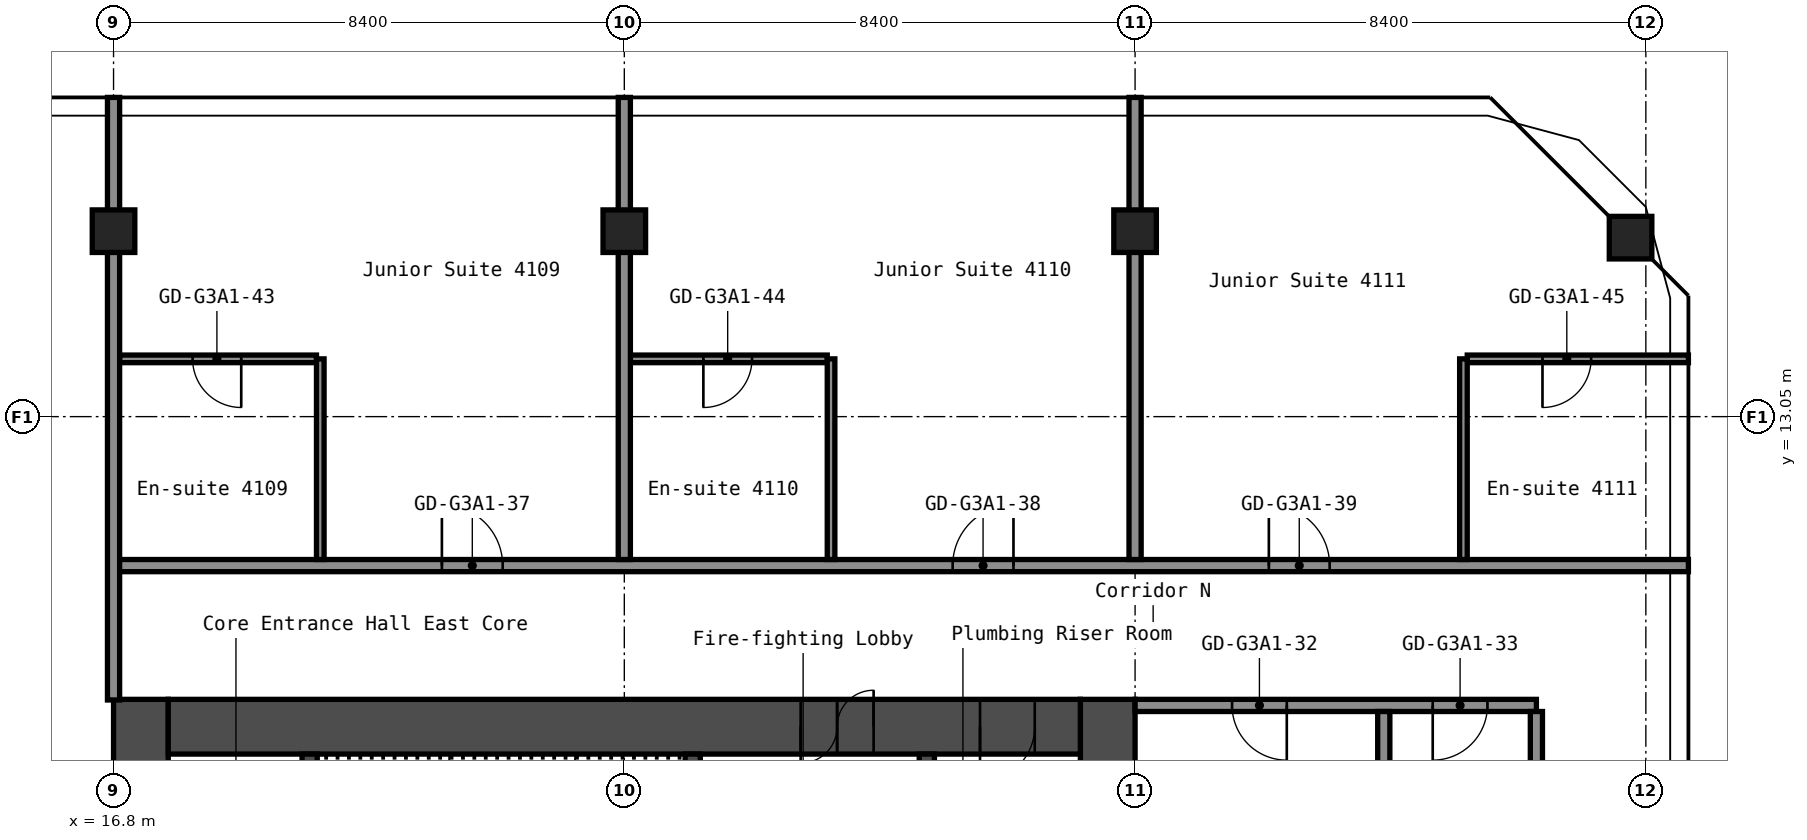
"""IFC4 building model, lengths in metres.
Left out: names, types, materials, properties, quantities, classifications, styles, units other than length and angle.
Written with IfcOpenShell. Run it as: python <this file> out.ifc"""

import sys

from ifc_helpers import new_model, si_unit, direction, frame, frame_2d, origin, origin_2d, place, context, subcontext, project, spatial, rectangle, hollow_rectangle, extrude, element, fill, save


model = new_model("IFC4")
c1 = context("Model", 3, precision=1e-05, world=origin(), true_north=direction((0.0, 1.0)))
c2 = subcontext(c1, "Body", "Model", "MODEL_VIEW")
j1 = project(units=[si_unit("LENGTHUNIT", "METRE"), si_unit("PLANEANGLEUNIT", "RADIAN")], contexts=[c1])
p1 = place(None, origin())
s1 = spatial("IfcSite", under=j1, at=p1, CompositionType="ELEMENT")
p2 = place(p1, origin())
s2 = spatial("IfcBuilding", under=s1, at=p2, CompositionType="ELEMENT")
p3 = place(p2, frame((0.0, 0.0, 147.0)))
s3 = spatial("IfcBuildingStorey", under=s2, at=p3, CompositionType="ELEMENT", Elevation=147.0)
for number, where, z_axis, x_axis in (
    (1, (16.8, 16.1, 0.0), (0.0, 0.0, 1.0), (1.0, 0.0, 0.0)),
    (2, (25.2, 16.1, 0.0), (0.0, 0.0, 1.0), (1.0, 0.0, 0.0)),
    (3, (33.6, 16.1, 0.0), (0.0, 0.0, 1.0), (1.0, 0.0, 0.0)),
    (4, (41.749, 15.994, 0.0), (0.0, 0.0, 1.0), (1.0, 0.0, 0.0)),
):
    element("IfcColumn", number, at=place(p3, frame(where, z_axis=z_axis, x_axis=x_axis)), inside=s3, PredefinedType="COLUMN", context=c2, shape_type="SweptSolid", body=[
        extrude(hollow_rectangle(XDim=0.7, YDim=0.7, WallThickness=0.028, at=origin_2d()), origin(), (0.0, 0.0, 1.0), 2.75),
    ])
p4 = place(p3, frame((17.25, -8.4, 0.0), z_axis=(0.0, 0.0, 1.0), x_axis=(0.0, 1.0, 0.0)))
e5 = element("IfcWall", 5, at=p4, inside=s3, PredefinedType="SHEAR", context=c2, shape_type="SweptSolid", body=[
    extrude(rectangle(XDim=16.8, YDim=0.9, at=frame_2d((8.4, 0.0))), origin(), (0.0, 0.0, 1.0), 2.75),
])
p5 = place(p4, frame((7.1, 0.0, 0.0)))
e6 = element("IfcOpeningElement", 6, at=p5, cuts=e5, PredefinedType="OPENING", context=c2, shape_type="SweptSolid", body=[
    extrude(rectangle(XDim=1.6, YDim=2.1, at=frame_2d((0.8, 1.05))), frame((0.0, 0.46, 0.0), z_axis=(0.0, -1.0, 0.0), x_axis=(1.0, 0.0, 0.0)), (0.0, 0.0, 1.0), 0.92),
])
p6 = place(p3, frame((33.15, -8.4, 0.0), z_axis=(0.0, 0.0, 1.0), x_axis=(0.0, 1.0, 0.0)))
e7 = element("IfcWall", 7, at=p6, inside=s3, PredefinedType="SHEAR", context=c2, shape_type="SweptSolid", body=[
    extrude(rectangle(XDim=16.8, YDim=0.9, at=frame_2d((8.4, 0.0))), origin(), (0.0, 0.0, 1.0), 2.75),
])
p7 = place(p3, frame((17.7, 7.95, 0.0), z_axis=(0.0, 0.0, 1.0), x_axis=(1.0, 0.0, 0.0)))
e8 = element("IfcWall", 8, at=p7, inside=s3, PredefinedType="SHEAR", context=c2, shape_type="SweptSolid", body=[
    extrude(rectangle(XDim=15.0, YDim=0.9, at=frame_2d((7.5, 0.0))), origin(), (0.0, 0.0, 1.0), 2.75),
])
p8 = place(p7, frame((10.4, 0.0, 0.0)))
e9 = element("IfcOpeningElement", 9, at=p8, cuts=e8, PredefinedType="OPENING", context=c2, shape_type="SweptSolid", body=[
    extrude(rectangle(XDim=1.2, YDim=2.1, at=frame_2d((0.6, 1.05))), frame((0.0, 0.46, 0.0), z_axis=(0.0, -1.0, 0.0), x_axis=(1.0, 0.0, 0.0)), (0.0, 0.0, 1.0), 0.92),
])
p9 = place(p7, frame((13.35, 0.0, 0.0)))
e10 = element("IfcOpeningElement", 10, at=p9, cuts=e8, PredefinedType="OPENING", context=c2, shape_type="SweptSolid", body=[
    extrude(rectangle(XDim=0.9, YDim=2.1, at=frame_2d((0.45, 1.05))), frame((0.0, 0.46, 0.0), z_axis=(0.0, -1.0, 0.0), x_axis=(1.0, 0.0, 0.0)), (0.0, 0.0, 1.0), 0.92),
])
p10 = place(p3, frame((20.025, 1.2, 0.0), z_axis=(0.0, 0.0, 1.0), x_axis=(0.0, 1.0, 0.0)))
e11 = element("IfcWall", 11, at=p10, inside=s3, PredefinedType="SHEAR", context=c2, shape_type="SweptSolid", body=[
    extrude(rectangle(XDim=6.3, YDim=0.25, at=frame_2d((3.15, 0.0))), origin(), (0.0, 0.0, 1.0), 2.75),
])
p11 = place(p3, frame((26.325, 3.75, 0.0), z_axis=(0.0, 0.0, 1.0), x_axis=(0.0, 1.0, 0.0)))
e12 = element("IfcWall", 12, at=p11, inside=s3, PredefinedType="SHEAR", context=c2, shape_type="SweptSolid", body=[
    extrude(rectangle(XDim=3.75, YDim=0.25, at=frame_2d((1.875, 0.0))), origin(), (0.0, 0.0, 1.0), 2.75),
])
p12 = place(p11, frame((1.25, 0.0, 0.0)))
e13 = element("IfcOpeningElement", 13, at=p12, cuts=e12, PredefinedType="OPENING", context=c2, shape_type="SweptSolid", body=[
    extrude(rectangle(XDim=1.2, YDim=2.1, at=frame_2d((0.6, 1.05))), frame((0.0, 0.135, 0.0), z_axis=(0.0, -1.0, 0.0), x_axis=(1.0, 0.0, 0.0)), (0.0, 0.0, 1.0), 0.27),
])
p13 = place(p3, frame((30.175, 1.45, 0.0), z_axis=(0.0, 0.0, 1.0), x_axis=(0.0, 1.0, 0.0)))
e14 = element("IfcWall", 14, at=p13, inside=s3, PredefinedType="SHEAR", context=c2, shape_type="SweptSolid", body=[
    extrude(rectangle(XDim=6.05, YDim=0.25, at=frame_2d((3.025, 0.0))), origin(), (0.0, 0.0, 1.0), 2.75),
])
p14 = place(p13, frame((2.625, 0.0, 0.0)))
e15 = element("IfcOpeningElement", 15, at=p14, cuts=e14, PredefinedType="OPENING", context=c2, shape_type="SweptSolid", body=[
    extrude(rectangle(XDim=1.1, YDim=2.1, at=frame_2d((0.55, 1.05))), frame((0.0, 0.135, 0.0), z_axis=(0.0, -1.0, 0.0), x_axis=(1.0, 0.0, 0.0)), (0.0, 0.0, 1.0), 0.27),
])
p15 = place(p3, frame((33.6, 8.3, 0.0), z_axis=(0.0, 0.0, 1.0), x_axis=(1.0, 0.0, 0.0)))
e16 = element("IfcWall", 16, at=p15, inside=s3, PredefinedType="PARTITIONING", context=c2, shape_type="SweptSolid", body=[
    extrude(rectangle(XDim=6.6, YDim=0.2, at=frame_2d((3.3, 0.0))), origin(), (0.0, 0.0, 1.0), 2.75),
])
p16 = place(p15, frame((1.595, 0.0, 0.0)))
e17 = element("IfcOpeningElement", 17, at=p16, cuts=e16, PredefinedType="OPENING", context=c2, shape_type="SweptSolid", body=[
    extrude(rectangle(XDim=0.9, YDim=2.1, at=frame_2d((0.45, 1.05))), frame((0.0, 0.11, 0.0), z_axis=(0.0, -1.0, 0.0), x_axis=(1.0, 0.0, 0.0)), (0.0, 0.0, 1.0), 0.22),
])
p17 = place(p15, frame((4.895, 0.0, 0.0)))
e18 = element("IfcOpeningElement", 18, at=p17, cuts=e16, PredefinedType="OPENING", context=c2, shape_type="SweptSolid", body=[
    extrude(rectangle(XDim=0.9, YDim=2.1, at=frame_2d((0.45, 1.05))), frame((0.0, 0.11, 0.0), z_axis=(0.0, -1.0, 0.0), x_axis=(1.0, 0.0, 0.0)), (0.0, 0.0, 1.0), 0.22),
])
p18 = place(p3, frame((16.8, 10.6, 0.0), z_axis=(0.0, 0.0, 1.0), x_axis=(1.0, 0.0, 0.0)))
e19 = element("IfcWall", 19, at=p18, inside=s3, PredefinedType="PARTITIONING", context=c2, shape_type="SweptSolid", body=[
    extrude(rectangle(XDim=25.9, YDim=0.2, at=frame_2d((12.95, 0.0))), origin(), (0.0, 0.0, 1.0), 2.75),
])
p19 = place(p18, frame((5.4, 0.0, 0.0)))
e20 = element("IfcOpeningElement", 20, at=p19, cuts=e19, PredefinedType="OPENING", context=c2, shape_type="SweptSolid", body=[
    extrude(rectangle(XDim=1.0, YDim=2.1, at=frame_2d((0.5, 1.05))), frame((0.0, 0.11, 0.0), z_axis=(0.0, -1.0, 0.0), x_axis=(1.0, 0.0, 0.0)), (0.0, 0.0, 1.0), 0.22),
])
p20 = place(p18, frame((13.8, 0.0, 0.0)))
e21 = element("IfcOpeningElement", 21, at=p20, cuts=e19, PredefinedType="OPENING", context=c2, shape_type="SweptSolid", body=[
    extrude(rectangle(XDim=1.0, YDim=2.1, at=frame_2d((0.5, 1.05))), frame((0.0, 0.11, 0.0), z_axis=(0.0, -1.0, 0.0), x_axis=(1.0, 0.0, 0.0)), (0.0, 0.0, 1.0), 0.22),
])
p21 = place(p18, frame((19.0, 0.0, 0.0)))
e22 = element("IfcOpeningElement", 22, at=p21, cuts=e19, PredefinedType="OPENING", context=c2, shape_type="SweptSolid", body=[
    extrude(rectangle(XDim=1.0, YDim=2.1, at=frame_2d((0.5, 1.05))), frame((0.0, 0.11, 0.0), z_axis=(0.0, -1.0, 0.0), x_axis=(1.0, 0.0, 0.0)), (0.0, 0.0, 1.0), 0.22),
])
p22 = place(p3, frame((16.9, 14.0, 0.0), z_axis=(0.0, 0.0, 1.0), x_axis=(1.0, 0.0, 0.0)))
e23 = element("IfcWall", 23, at=p22, inside=s3, PredefinedType="PARTITIONING", context=c2, shape_type="SweptSolid", body=[
    extrude(rectangle(XDim=3.238, YDim=0.125, at=frame_2d((1.619, 0.0))), origin(), (0.0, 0.0, 1.0), 2.75),
])
p23 = place(p22, frame((1.2, 0.0, 0.0)))
e24 = element("IfcOpeningElement", 24, at=p23, cuts=e23, PredefinedType="OPENING", context=c2, shape_type="SweptSolid", body=[
    extrude(rectangle(XDim=0.8, YDim=2.1, at=frame_2d((0.4, 1.05))), frame((0.0, 0.073, 0.0), z_axis=(0.0, -1.0, 0.0), x_axis=(1.0, 0.0, 0.0)), (0.0, 0.0, 1.0), 0.145),
])
p24 = place(p3, frame((25.3, 14.0, 0.0), z_axis=(0.0, 0.0, 1.0), x_axis=(1.0, 0.0, 0.0)))
e25 = element("IfcWall", 25, at=p24, inside=s3, PredefinedType="PARTITIONING", context=c2, shape_type="SweptSolid", body=[
    extrude(rectangle(XDim=3.238, YDim=0.125, at=frame_2d((1.619, 0.0))), origin(), (0.0, 0.0, 1.0), 2.75),
])
p25 = place(p24, frame((1.2, 0.0, 0.0)))
e26 = element("IfcOpeningElement", 26, at=p25, cuts=e25, PredefinedType="OPENING", context=c2, shape_type="SweptSolid", body=[
    extrude(rectangle(XDim=0.8, YDim=2.1, at=frame_2d((0.4, 1.05))), frame((0.0, 0.073, 0.0), z_axis=(0.0, -1.0, 0.0), x_axis=(1.0, 0.0, 0.0)), (0.0, 0.0, 1.0), 0.145),
])
p26 = place(p3, frame((39.062, 14.0, 0.0), z_axis=(0.0, 0.0, 1.0), x_axis=(1.0, 0.0, 0.0)))
e27 = element("IfcWall", 27, at=p26, inside=s3, PredefinedType="PARTITIONING", context=c2, shape_type="SweptSolid", body=[
    extrude(rectangle(XDim=3.637, YDim=0.125, at=frame_2d((1.819, 0.0))), origin(), (0.0, 0.0, 1.0), 2.75),
])
p27 = place(p26, frame((1.238, 0.0, 0.0)))
e28 = element("IfcOpeningElement", 28, at=p27, cuts=e27, PredefinedType="OPENING", context=c2, shape_type="SweptSolid", body=[
    extrude(rectangle(XDim=0.8, YDim=2.1, at=frame_2d((0.4, 1.05))), frame((0.0, 0.073, 0.0), z_axis=(0.0, -1.0, 0.0), x_axis=(1.0, 0.0, 0.0)), (0.0, 0.0, 1.0), 0.145),
])
p28 = place(p3, frame((16.8, 8.39, 0.0), z_axis=(0.0, 0.0, 1.0), x_axis=(0.0, 1.0, 0.0)))
e29 = element("IfcWall", 29, at=p28, inside=s3, PredefinedType="PARTITIONING", context=c2, shape_type="SweptSolid", body=[
    extrude(rectangle(XDim=9.91, YDim=0.2, at=frame_2d((4.955, 0.0))), origin(), (0.0, 0.0, 1.0), 2.75),
])
p29 = place(p3, frame((20.2, 10.7, 0.0), z_axis=(0.0, 0.0, 1.0), x_axis=(0.0, 1.0, 0.0)))
e30 = element("IfcWall", 30, at=p29, inside=s3, PredefinedType="PARTITIONING", context=c2, shape_type="SweptSolid", body=[
    extrude(rectangle(XDim=3.3, YDim=0.125, at=frame_2d((1.65, 0.0))), origin(), (0.0, 0.0, 1.0), 2.75),
])
p30 = place(p3, frame((25.2, 10.7, 0.0), z_axis=(0.0, 0.0, 1.0), x_axis=(0.0, 1.0, 0.0)))
e31 = element("IfcWall", 31, at=p30, inside=s3, PredefinedType="PARTITIONING", context=c2, shape_type="SweptSolid", body=[
    extrude(rectangle(XDim=7.6, YDim=0.2, at=frame_2d((3.8, 0.0))), origin(), (0.0, 0.0, 1.0), 2.75),
])
p31 = place(p3, frame((28.6, 10.7, 0.0), z_axis=(0.0, 0.0, 1.0), x_axis=(0.0, 1.0, 0.0)))
e32 = element("IfcWall", 32, at=p31, inside=s3, PredefinedType="PARTITIONING", context=c2, shape_type="SweptSolid", body=[
    extrude(rectangle(XDim=3.3, YDim=0.125, at=frame_2d((1.65, 0.0))), origin(), (0.0, 0.0, 1.0), 2.75),
])
p32 = place(p3, frame((33.6, 10.7, 0.0), z_axis=(0.0, 0.0, 1.0), x_axis=(0.0, 1.0, 0.0)))
e33 = element("IfcWall", 33, at=p32, inside=s3, PredefinedType="PARTITIONING", context=c2, shape_type="SweptSolid", body=[
    extrude(rectangle(XDim=7.6, YDim=0.2, at=frame_2d((3.8, 0.0))), origin(), (0.0, 0.0, 1.0), 2.75),
])
p33 = place(p3, frame((37.69, 0.0, 0.0), z_axis=(0.0, 0.0, 1.0), x_axis=(0.0, 1.0, 0.0)))
e34 = element("IfcWall", 34, at=p33, inside=s3, PredefinedType="PARTITIONING", context=c2, shape_type="SweptSolid", body=[
    extrude(rectangle(XDim=8.2, YDim=0.2, at=frame_2d((4.1, 0.0))), origin(), (0.0, 0.0, 1.0), 2.75),
])
p34 = place(p3, frame((39.0, 10.7, 0.0), z_axis=(0.0, 0.0, 1.0), x_axis=(0.0, 1.0, 0.0)))
e35 = element("IfcWall", 35, at=p34, inside=s3, PredefinedType="PARTITIONING", context=c2, shape_type="SweptSolid", body=[
    extrude(rectangle(XDim=3.3, YDim=0.125, at=frame_2d((1.65, 0.0))), origin(), (0.0, 0.0, 1.0), 2.75),
])
p35 = place(p3, frame((40.2, -8.2, 0.0), z_axis=(0.0, 0.0, 1.0), x_axis=(0.0, 1.0, 0.0)))
e36 = element("IfcWall", 36, at=p35, inside=s3, PredefinedType="PARTITIONING", context=c2, shape_type="SweptSolid", body=[
    extrude(rectangle(XDim=16.4, YDim=0.2, at=frame_2d((8.2, 0.0))), origin(), (0.0, 0.0, 1.0), 2.75),
])
p36 = place(p8, origin())
e37 = element("IfcDoor", 37, at=p36, inside=s3, OperationType="DOUBLE_DOOR_SINGLE_SWING", PredefinedType="DOOR", context=c2, shape_type="SweptSolid", body=[
    extrude(rectangle(XDim=1.2, YDim=2.1, at=frame_2d((0.6, 1.05))), frame((0.0, 0.025, 0.0), z_axis=(0.0, -1.0, 0.0), x_axis=(1.0, 0.0, 0.0)), (0.0, 0.0, 1.0), 0.05),
])
fill(e9, e37)
p37 = place(p9, origin())
e38 = element("IfcDoor", 38, at=p37, inside=s3, OperationType="SINGLE_SWING_LEFT", PredefinedType="DOOR", context=c2, shape_type="SweptSolid", body=[
    extrude(rectangle(XDim=0.9, YDim=2.1, at=frame_2d((0.45, 1.05))), frame((0.0, 0.025, 0.0), z_axis=(0.0, -1.0, 0.0), x_axis=(1.0, 0.0, 0.0)), (0.0, 0.0, 1.0), 0.05),
])
fill(e10, e38)
p38 = place(p16, origin())
e39 = element("IfcDoor", 39, at=p38, inside=s3, OperationType="SINGLE_SWING_RIGHT", PredefinedType="DOOR", context=c2, shape_type="SweptSolid", body=[
    extrude(rectangle(XDim=0.9, YDim=2.1, at=frame_2d((0.45, 1.05))), frame((0.0, 0.025, 0.0), z_axis=(0.0, -1.0, 0.0), x_axis=(1.0, 0.0, 0.0)), (0.0, 0.0, 1.0), 0.05),
])
fill(e17, e39)
p39 = place(p17, origin())
e40 = element("IfcDoor", 40, at=p39, inside=s3, OperationType="SINGLE_SWING_LEFT", PredefinedType="DOOR", context=c2, shape_type="SweptSolid", body=[
    extrude(rectangle(XDim=0.9, YDim=2.1, at=frame_2d((0.45, 1.05))), frame((0.0, 0.025, 0.0), z_axis=(0.0, -1.0, 0.0), x_axis=(1.0, 0.0, 0.0)), (0.0, 0.0, 1.0), 0.05),
])
fill(e18, e40)
p40 = place(p19, origin())
e41 = element("IfcDoor", 41, at=p40, inside=s3, OperationType="SINGLE_SWING_RIGHT", PredefinedType="DOOR", context=c2, shape_type="SweptSolid", body=[
    extrude(rectangle(XDim=1.0, YDim=2.1, at=frame_2d((0.5, 1.05))), frame((0.0, 0.025, 0.0), z_axis=(0.0, -1.0, 0.0), x_axis=(1.0, 0.0, 0.0)), (0.0, 0.0, 1.0), 0.05),
])
fill(e20, e41)
p41 = place(p20, origin())
e42 = element("IfcDoor", 42, at=p41, inside=s3, OperationType="SINGLE_SWING_LEFT", PredefinedType="DOOR", context=c2, shape_type="SweptSolid", body=[
    extrude(rectangle(XDim=1.0, YDim=2.1, at=frame_2d((0.5, 1.05))), frame((0.0, 0.025, 0.0), z_axis=(0.0, -1.0, 0.0), x_axis=(1.0, 0.0, 0.0)), (0.0, 0.0, 1.0), 0.05),
])
fill(e21, e42)
p42 = place(p21, origin())
e43 = element("IfcDoor", 43, at=p42, inside=s3, OperationType="SINGLE_SWING_RIGHT", PredefinedType="DOOR", context=c2, shape_type="SweptSolid", body=[
    extrude(rectangle(XDim=1.0, YDim=2.1, at=frame_2d((0.5, 1.05))), frame((0.0, 0.025, 0.0), z_axis=(0.0, -1.0, 0.0), x_axis=(1.0, 0.0, 0.0)), (0.0, 0.0, 1.0), 0.05),
])
fill(e22, e43)
p43 = place(p23, origin())
e44 = element("IfcDoor", 44, at=p43, inside=s3, OperationType="SINGLE_SWING_RIGHT", PredefinedType="DOOR", context=c2, shape_type="SweptSolid", body=[
    extrude(rectangle(XDim=0.8, YDim=2.1, at=frame_2d((0.4, 1.05))), frame((0.0, 0.025, 0.0), z_axis=(0.0, -1.0, 0.0), x_axis=(1.0, 0.0, 0.0)), (0.0, 0.0, 1.0), 0.05),
])
fill(e24, e44)
p44 = place(p25, origin())
e45 = element("IfcDoor", 45, at=p44, inside=s3, OperationType="SINGLE_SWING_LEFT", PredefinedType="DOOR", context=c2, shape_type="SweptSolid", body=[
    extrude(rectangle(XDim=0.8, YDim=2.1, at=frame_2d((0.4, 1.05))), frame((0.0, 0.025, 0.0), z_axis=(0.0, -1.0, 0.0), x_axis=(1.0, 0.0, 0.0)), (0.0, 0.0, 1.0), 0.05),
])
fill(e26, e45)
p45 = place(p27, origin())
e46 = element("IfcDoor", 46, at=p45, inside=s3, OperationType="SINGLE_SWING_LEFT", PredefinedType="DOOR", context=c2, shape_type="SweptSolid", body=[
    extrude(rectangle(XDim=0.8, YDim=2.1, at=frame_2d((0.4, 1.05))), frame((0.0, 0.025, 0.0), z_axis=(0.0, -1.0, 0.0), x_axis=(1.0, 0.0, 0.0)), (0.0, 0.0, 1.0), 0.05),
])
fill(e28, e46)
save(model, sys.argv[1])
